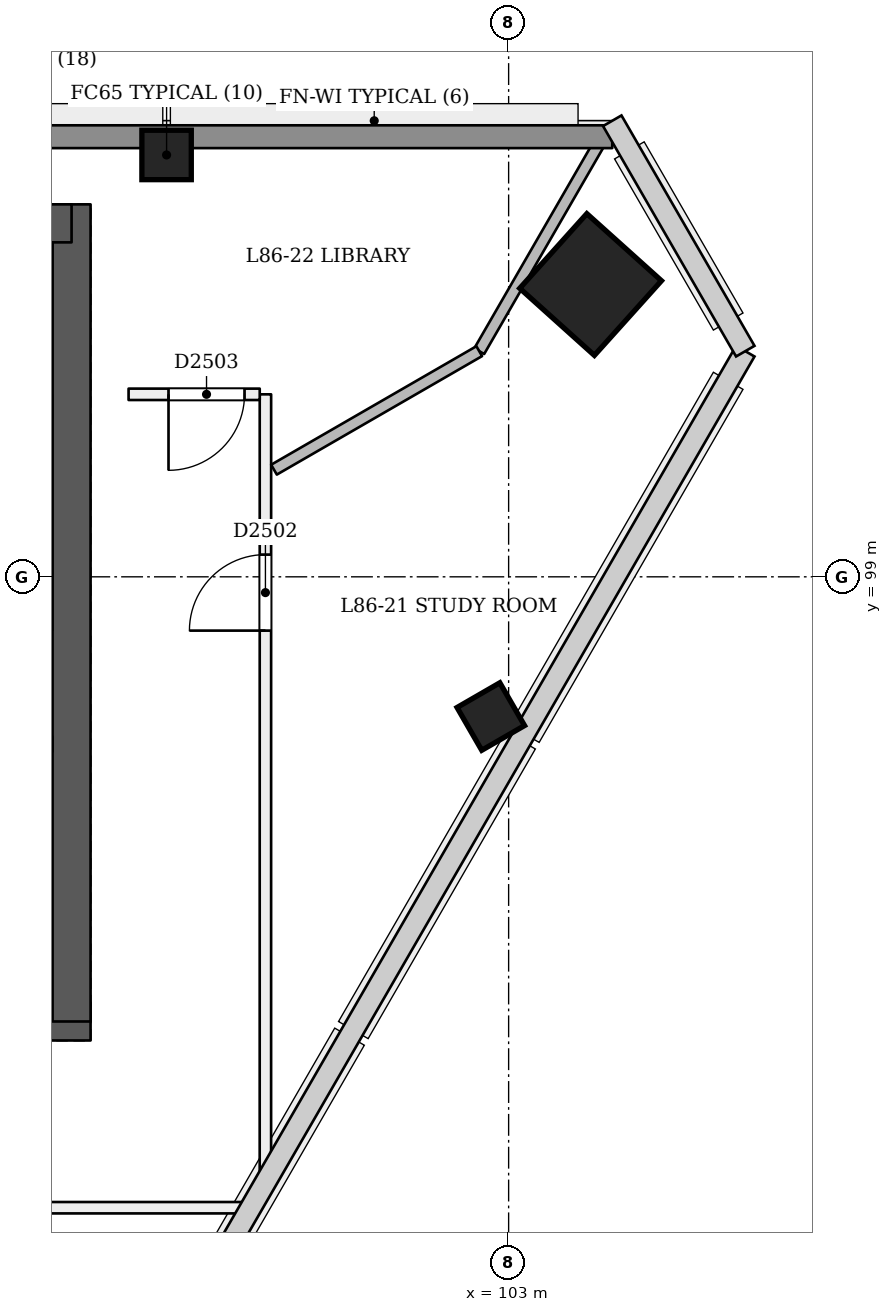
"""IFC4 building model, lengths in metres.
Left out: names, types, materials, properties, quantities, classifications, styles, units other than length and angle.
Written with IfcOpenShell. Run it as: python <this file> out.ifc"""

import sys

from ifc_helpers import new_model, si_unit, direction, frame, frame_2d, origin, origin_2d, place, context, subcontext, project, spatial, rectangle, extrude, element, fill, save


model = new_model("IFC4")
c1 = context("Model", 3, precision=1e-05, world=origin(), true_north=direction((0.0, 1.0)))
c2 = subcontext(c1, "Body", "Model", "MODEL_VIEW")
j1 = project(units=[si_unit("LENGTHUNIT", "METRE"), si_unit("PLANEANGLEUNIT", "RADIAN")], contexts=[c1])
p1 = place(None, origin())
s1 = spatial("IfcSite", under=j1, at=p1, CompositionType="ELEMENT")
p2 = place(p1, origin())
s2 = spatial("IfcBuilding", under=s1, at=p2, CompositionType="ELEMENT")
p3 = place(p2, frame((0.0, 0.0, 331.0)))
s3 = spatial("IfcBuildingStorey", under=s2, at=p3, CompositionType="ELEMENT", Elevation=331.0)
p4 = place(p3, frame((72.75, 93.15, 0.0), z_axis=(0.0, 0.0, 1.0), x_axis=(1.0, 0.0, 0.0)))
e1 = element("IfcWall", 1, at=p4, inside=s3, PredefinedType="SHEAR", context=c2, shape_type="SweptSolid", body=[
    extrude(rectangle(XDim=24.75, YDim=0.5, at=frame_2d((12.375, 0.0))), origin(), (0.0, 0.0, 1.0), 3.6),
])
p5 = place(p4, frame((1.05, 0.0, 0.0)))
e2 = element("IfcOpeningElement", 2, at=p5, cuts=e1, PredefinedType="OPENING", context=c2, shape_type="SweptSolid", body=[
    extrude(rectangle(XDim=1.2, YDim=2.1, at=frame_2d((0.6, 1.05))), frame((0.0, 0.26, 0.0), z_axis=(0.0, -1.0, 0.0), x_axis=(1.0, 0.0, 0.0)), (0.0, 0.0, 1.0), 0.521),
])
p6 = place(p4, frame((3.25, 0.0, 0.0)))
e3 = element("IfcOpeningElement", 3, at=p6, cuts=e1, PredefinedType="OPENING", context=c2, shape_type="SweptSolid", body=[
    extrude(rectangle(XDim=1.2, YDim=2.1, at=frame_2d((0.6, 1.05))), frame((0.0, 0.26, 0.0), z_axis=(0.0, -1.0, 0.0), x_axis=(1.0, 0.0, 0.0)), (0.0, 0.0, 1.0), 0.521),
])
p7 = place(p4, frame((13.25, 0.0, 0.0)))
e4 = element("IfcOpeningElement", 4, at=p7, cuts=e1, PredefinedType="OPENING", context=c2, shape_type="SweptSolid", body=[
    extrude(rectangle(XDim=1.2, YDim=2.1, at=frame_2d((0.6, 1.05))), frame((0.0, 0.26, 0.0), z_axis=(0.0, -1.0, 0.0), x_axis=(1.0, 0.0, 0.0)), (0.0, 0.0, 1.0), 0.521),
])
p8 = place(p4, frame((15.212, 0.0, 0.0)))
e5 = element("IfcOpeningElement", 5, at=p8, cuts=e1, PredefinedType="OPENING", context=c2, shape_type="SweptSolid", body=[
    extrude(rectangle(XDim=1.0, YDim=2.1, at=frame_2d((0.5, 1.05))), frame((0.0, 0.26, 0.0), z_axis=(0.0, -1.0, 0.0), x_axis=(1.0, 0.0, 0.0)), (0.0, 0.0, 1.0), 0.521),
])
p9 = place(p4, frame((18.05, 0.0, 0.0)))
e6 = element("IfcOpeningElement", 6, at=p9, cuts=e1, PredefinedType="OPENING", context=c2, shape_type="SweptSolid", body=[
    extrude(rectangle(XDim=1.0, YDim=2.1, at=frame_2d((0.5, 1.05))), frame((0.0, 0.26, 0.0), z_axis=(0.0, -1.0, 0.0), x_axis=(1.0, 0.0, 0.0)), (0.0, 0.0, 1.0), 0.521),
])
p10 = place(p4, frame((20.95, 0.0, 0.0)))
e7 = element("IfcOpeningElement", 7, at=p10, cuts=e1, PredefinedType="OPENING", context=c2, shape_type="SweptSolid", body=[
    extrude(rectangle(XDim=1.0, YDim=2.1, at=frame_2d((0.5, 1.05))), frame((0.0, 0.26, 0.0), z_axis=(0.0, -1.0, 0.0), x_axis=(1.0, 0.0, 0.0)), (0.0, 0.0, 1.0), 0.521),
])
p11 = place(p4, frame((22.837, 0.0, 0.0)))
e8 = element("IfcOpeningElement", 8, at=p11, cuts=e1, PredefinedType="OPENING", context=c2, shape_type="SweptSolid", body=[
    extrude(rectangle(XDim=1.0, YDim=2.1, at=frame_2d((0.5, 1.05))), frame((0.0, 0.26, 0.0), z_axis=(0.0, -1.0, 0.0), x_axis=(1.0, 0.0, 0.0)), (0.0, 0.0, 1.0), 0.521),
])
p12 = place(p3, frame((97.25, 93.15, 0.0), z_axis=(0.0, 0.0, 1.0), x_axis=(0.0, 1.0, 0.0)))
e9 = element("IfcWall", 9, at=p12, inside=s3, PredefinedType="SHEAR", context=c2, shape_type="SweptSolid", body=[
    extrude(rectangle(XDim=10.75, YDim=0.5, at=frame_2d((5.375, 0.0))), origin(), (0.0, 0.0, 1.0), 3.6),
])
p13 = place(p3, frame((97.25, 103.65, 0.0), z_axis=(0.0, 0.0, 1.0), x_axis=(-1.0, 0.0, 0.0)))
e10 = element("IfcWall", 10, at=p13, inside=s3, PredefinedType="SHEAR", context=c2, shape_type="SweptSolid", body=[
    extrude(rectangle(XDim=24.75, YDim=0.5, at=frame_2d((12.375, 0.0))), origin(), (0.0, 0.0, 1.0), 3.6),
])
p14 = place(p3, frame((104.113, 102.834, 0.0), z_axis=(-0.028334066552, 0.009286524205, 0.999555371723), x_axis=(0.498275449892, -0.866735113681, 0.022176986887)))
e11 = element("IfcColumn", 11, at=p14, inside=s3, PredefinedType="COLUMN", context=c2, shape_type="SweptSolid", body=[
    extrude(rectangle(XDim=1.32, YDim=1.32, at=origin_2d()), origin(), (0.0, 0.0, 1.0), 3.602),
])
p15 = place(p3, frame((98.5, 104.55, 0.0), z_axis=(0.0, 0.0, 1.0), x_axis=(1.0, 0.0, 0.0)))
e12 = element("IfcColumn", 12, at=p15, inside=s3, PredefinedType="COLUMN", context=c2, shape_type="SweptSolid", body=[
    extrude(rectangle(XDim=0.65, YDim=0.65, at=origin_2d()), origin(), (0.0, 0.0, 1.0), 3.6),
])
p16 = place(p3, frame((102.792, 97.115, -0.02), z_axis=(-0.022153634206, 0.038480930364, 0.999013730882), x_axis=(-0.501310182066, -0.864982774031, 0.022201396047)))
e13 = element("IfcColumn", 13, at=p16, inside=s3, PredefinedType="COLUMN", context=c2, shape_type="SweptSolid", body=[
    extrude(rectangle(XDim=0.65, YDim=0.65, at=origin_2d()), origin(), (0.0, 0.0, 1.0), 3.604),
])
p17 = place(p3, frame((92.102, 90.7, 0.0), z_axis=(0.0, 0.0, 1.0), x_axis=(1.0, 0.0, 0.0)))
e14 = element("IfcWall", 14, at=p17, inside=s3, PredefinedType="PARTITIONING", context=c2, shape_type="SweptSolid", body=[
    extrude(rectangle(XDim=7.419, YDim=0.15, at=frame_2d((3.71, 0.0))), origin(), (0.0, 0.0, 1.0), 3.3),
])
p18 = place(p17, frame((3.736, 0.0, 0.0)))
e15 = element("IfcOpeningElement", 15, at=p18, cuts=e14, PredefinedType="OPENING", context=c2, shape_type="SweptSolid", body=[
    extrude(rectangle(XDim=1.0, YDim=2.1, at=frame_2d((0.5, 1.05))), frame((0.0, 0.085, 0.0), z_axis=(0.0, -1.0, 0.0), x_axis=(1.0, 0.0, 0.0)), (0.0, 0.0, 1.0), 0.171),
])
p19 = place(p3, frame((99.8, 91.153, 0.0), z_axis=(0.0, 0.0, 1.0), x_axis=(4.7648544e-05, 0.999999998865, 0.0)))
e16 = element("IfcWall", 16, at=p19, inside=s3, PredefinedType="PARTITIONING", context=c2, shape_type="SweptSolid", body=[
    extrude(rectangle(XDim=10.248, YDim=0.15, at=frame_2d((5.124, 0.0))), origin(), (0.0, 0.0, 1.0), 3.3),
])
p20 = place(p19, frame((7.139, 0.0, 0.0)))
e17 = element("IfcOpeningElement", 17, at=p20, cuts=e16, PredefinedType="OPENING", context=c2, shape_type="SweptSolid", body=[
    extrude(rectangle(XDim=1.0, YDim=2.1, at=frame_2d((0.5, 1.05))), frame((0.0, 0.085, 0.0), z_axis=(0.0, -1.0, 0.0), x_axis=(1.0, 0.0, 0.0)), (0.0, 0.0, 1.0), 0.171),
])
p21 = place(p3, frame((99.726, 101.401, 0.0), z_axis=(0.0, 0.0, 1.0), x_axis=(-1.0, 0.0, 0.0)))
e18 = element("IfcWall", 18, at=p21, inside=s3, PredefinedType="PARTITIONING", context=c2, shape_type="SweptSolid", body=[
    extrude(rectangle(XDim=1.726, YDim=0.15, at=frame_2d((0.863, 0.0))), origin(), (0.0, 0.0, 1.0), 3.3),
])
p22 = place(p21, frame((0.2, 0.0, 0.0)))
e19 = element("IfcOpeningElement", 19, at=p22, cuts=e18, PredefinedType="OPENING", context=c2, shape_type="SweptSolid", body=[
    extrude(rectangle(XDim=1.0, YDim=2.1, at=frame_2d((0.5, 1.05))), frame((0.0, 0.085, 0.0), z_axis=(0.0, -1.0, 0.0), x_axis=(1.0, 0.0, 0.0)), (0.0, 0.0, 1.0), 0.171),
])
p23 = place(p3, frame((104.306, 104.9, 0.0), z_axis=(0.0, 0.0, 1.0), x_axis=(-0.500017996867, -0.866015013039, 0.0)))
e20 = element("IfcWall", 20, at=p23, inside=s3, PredefinedType="PARTITIONING", context=c2, shape_type="SweptSolid", body=[
    extrude(rectangle(XDim=3.385, YDim=0.15, at=frame_2d((1.692, 0.0))), origin(), (0.0, 0.0, 1.0), 3.3),
])
p24 = place(p3, frame((102.613, 101.969, 0.0), z_axis=(0.0, 0.0, 1.0), x_axis=(-0.866027821991, -0.499995811521, 0.0)))
e21 = element("IfcWall", 21, at=p24, inside=s3, PredefinedType="PARTITIONING", context=c2, shape_type="SweptSolid", body=[
    extrude(rectangle(XDim=3.118, YDim=0.15, at=frame_2d((1.559, 0.0))), origin(), (0.0, 0.0, 1.0), 3.3),
])
p25 = place(p3, frame((65.637, 104.79, 0.0), z_axis=(0.0, 0.0, 1.0), x_axis=(1.0, 0.0, 0.0)))
e22 = element("IfcWall", 22, at=p25, inside=s3, PredefinedType="SOLIDWALL", context=c2, shape_type="SweptSolid", body=[
    extrude(rectangle(XDim=38.727, YDim=0.3, at=frame_2d((19.363, 0.0))), origin(), (0.0, 0.0, 1.0), 3.3),
])
p26 = place(p20, origin())
e23 = element("IfcDoor", 23, at=p26, inside=s3, OperationType="SINGLE_SWING_LEFT", PredefinedType="NOTDEFINED", context=c2, shape_type="SweptSolid", body=[
    extrude(rectangle(XDim=1.0, YDim=2.1, at=frame_2d((0.5, 1.05))), frame((0.0, 0.025, 0.0), z_axis=(0.0, -1.0, 0.0), x_axis=(1.0, 0.0, 0.0)), (0.0, 0.0, 1.0), 0.05),
])
fill(e17, e23)
p27 = place(p22, origin())
e24 = element("IfcDoor", 24, at=p27, inside=s3, OperationType="SINGLE_SWING_RIGHT", PredefinedType="NOTDEFINED", context=c2, shape_type="SweptSolid", body=[
    extrude(rectangle(XDim=1.0, YDim=2.1, at=frame_2d((0.5, 1.05))), frame((0.0, 0.025, 0.0), z_axis=(0.0, -1.0, 0.0), x_axis=(1.0, 0.0, 0.0)), (0.0, 0.0, 1.0), 0.05),
])
fill(e19, e24)
save(model, sys.argv[1])
